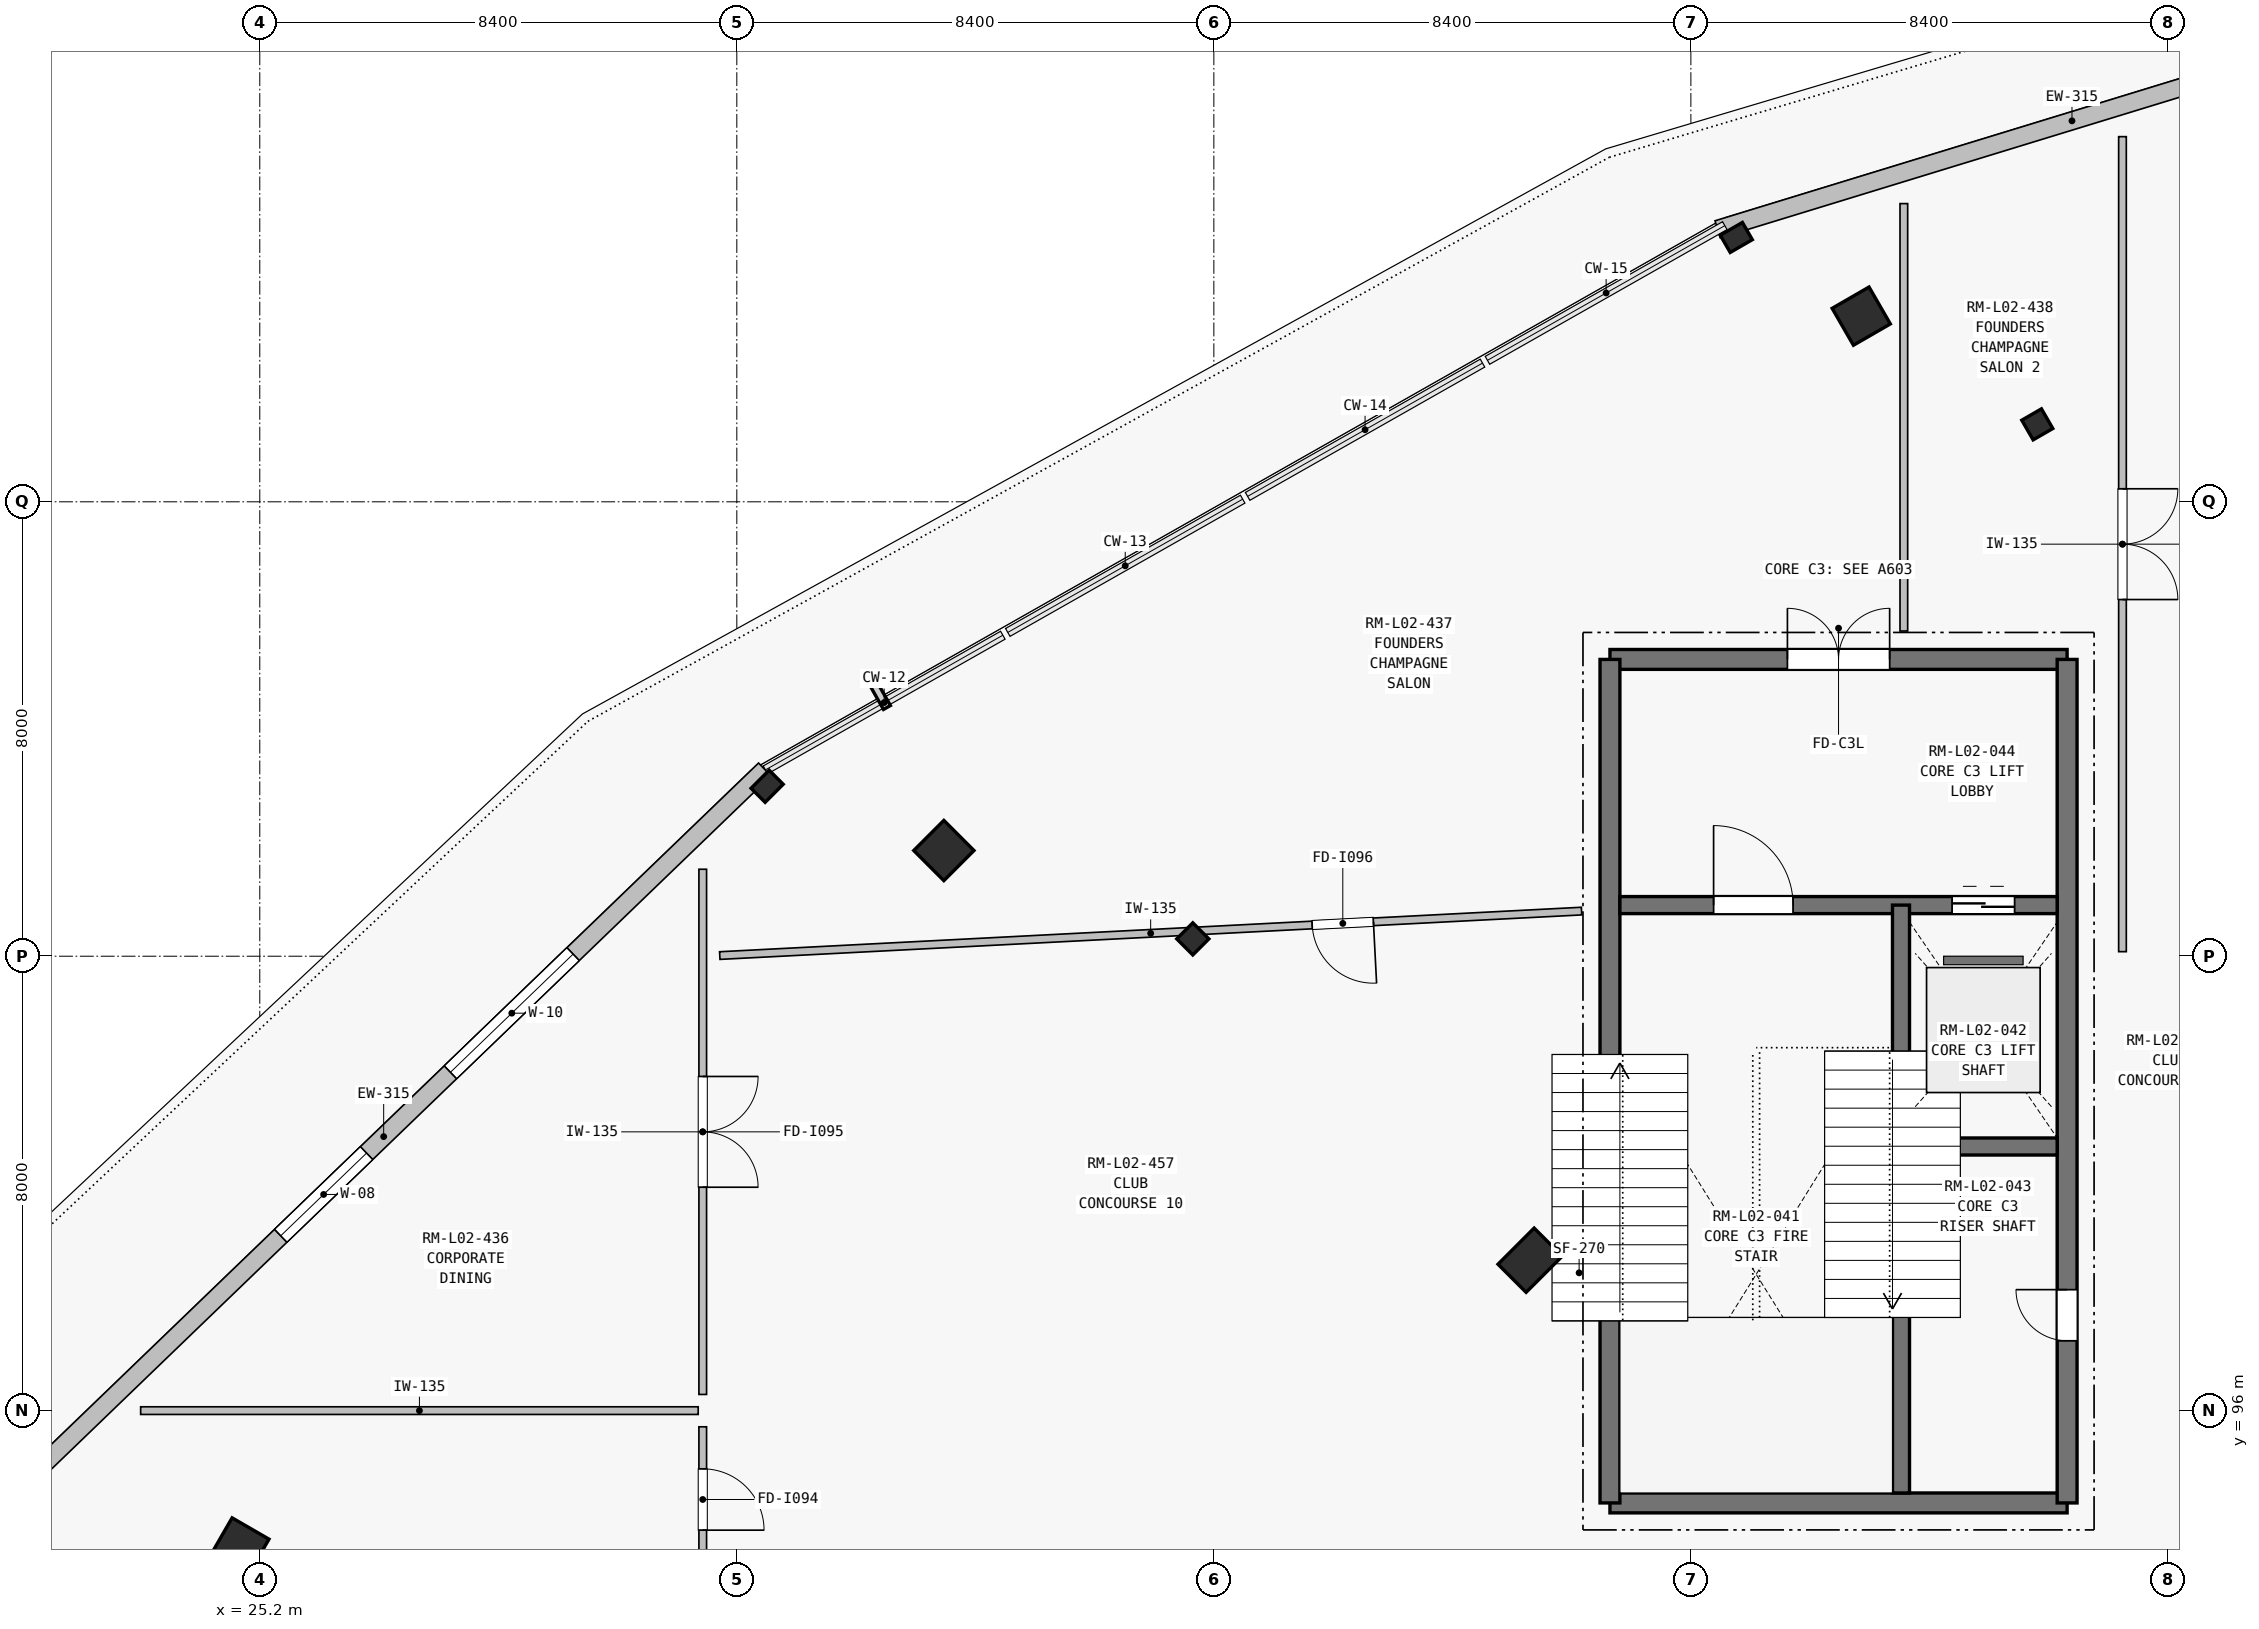
"""IFC4 building model, lengths in metres.
Left out: names, types, materials, properties, quantities, classifications, styles, units other than length and angle.
Written with IfcOpenShell. Run it as: python <this file> out.ifc"""

import sys

from ifc_helpers import new_model, si_unit, direction, frame, frame_2d, origin, origin_2d, place, context, subcontext, project, spatial, rectangle, i_section, extrude, element, fill, save


model = new_model("IFC4")
c1 = context("Model", 3, precision=1e-05, world=origin(), true_north=direction((0.0, 1.0)))
c2 = subcontext(c1, "Body", "Model", "MODEL_VIEW")
j1 = project(units=[si_unit("LENGTHUNIT", "METRE"), si_unit("PLANEANGLEUNIT", "RADIAN")], contexts=[c1])
p1 = place(None, origin())
s1 = spatial("IfcSite", under=j1, at=p1, CompositionType="ELEMENT")
p2 = place(p1, origin())
s2 = spatial("IfcBuilding", under=s1, at=p2, CompositionType="ELEMENT")
p3 = place(p2, frame((0.0, 0.0, 9.9)))
s3 = spatial("IfcBuildingStorey", under=s2, at=p3, CompositionType="ELEMENT", Elevation=9.9)
p4 = place(p3, frame((47.569, 98.648, 0.0), z_axis=(0.0, 0.0, 1.0), x_axis=(-0.707106781187, 0.707106781187, 0.0)))
e1 = element("IfcColumn", 1, at=p4, inside=s3, PredefinedType="COLUMN", context=c2, shape_type="SweptSolid", body=[
    extrude(rectangle(XDim=0.7, YDim=0.9, at=origin_2d()), origin(), (0.0, 0.0, 1.0), 4.5),
])
for number, where, z_axis, x_axis in (
    (2, (56.5, 113.363, 0.0), (0.0, 0.0, 1.0), (-0.5, 0.866, 0.0)),
    (3, (41.63, 104.305, 0.0), (0.0, 0.0, 1.0), (-0.707, 0.707, 0.0)),
):
    element("IfcColumn", number, at=place(p3, frame(where, z_axis=z_axis, x_axis=x_axis)), inside=s3, PredefinedType="COLUMN", context=c2, shape_type="SweptSolid", body=[
        extrude(i_section(OverallWidth=0.4, OverallDepth=0.4, WebThickness=0.016, FlangeThickness=0.028, at=origin_2d()), origin(), (0.0, 0.0, 1.0), 4.5),
    ])
for number, where, z_axis, x_axis in (
    (4, (53.4, 115.269, 0.0), (0.0, 0.0, 1.0), (-0.5, 0.866, 0.0)),
    (5, (37.246, 105.861, 0.0), (0.0, 0.0, 1.0), (-0.707, 0.707, 0.0)),
    (6, (24.85, 93.6, 0.0), (0.0, 0.0, 1.0), (-0.866, 0.5, 0.0)),
):
    element("IfcColumn", number, at=place(p3, frame(where, z_axis=z_axis, x_axis=x_axis)), inside=s3, PredefinedType="COLUMN", context=c2, shape_type="SweptSolid", body=[
        extrude(rectangle(XDim=0.75, YDim=0.75, at=origin_2d()), origin(), (0.0, 0.0, 1.0), 4.5),
    ])
for number, where, z_axis, x_axis in (
    (7, (51.2, 116.654, 0.0), (0.0, 0.0, 1.0), (-0.5, 0.866, 0.0)),
    (8, (34.134, 106.992, 0.0), (0.0, 0.0, 1.0), (-0.707, 0.707, 0.0)),
):
    element("IfcColumn", number, at=place(p3, frame(where, z_axis=z_axis, x_axis=x_axis)), inside=s3, PredefinedType="PILASTER", context=c2, shape_type="SweptSolid", body=[
        extrude(rectangle(XDim=0.35, YDim=0.45, at=origin_2d()), origin(), (0.0, 0.0, 1.0), 5.45),
    ])
p5 = place(p3, frame((20.671, 94.36, 0.0), z_axis=(0.0, 0.0, 1.0), x_axis=(0.720214986834, 0.693750944316, 0.0)))
e9 = element("IfcWall", 9, at=p5, inside=s3, PredefinedType="SOLIDWALL", context=c2, shape_type="SweptSolid", body=[
    extrude(rectangle(XDim=18.635, YDim=0.315, at=frame_2d((9.318, 0.0))), origin(), (0.0, 0.0, 1.0), 4.265),
])
p6 = place(p5, frame((6.8, 0.0, 0.9)))
e10 = element("IfcOpeningElement", 10, at=p6, cuts=e9, PredefinedType="OPENING", context=c2, shape_type="SweptSolid", body=[
    extrude(rectangle(XDim=2.1, YDim=2.0, at=frame_2d((1.05, 1.0))), frame((0.0, 0.167, 0.0), z_axis=(0.0, -1.0, 0.0), x_axis=(1.0, 0.0, 0.0)), (0.0, 0.0, 1.0), 0.335),
])
p7 = place(p5, frame((10.95, 0.0, 0.9)))
e11 = element("IfcOpeningElement", 11, at=p7, cuts=e9, PredefinedType="OPENING", context=c2, shape_type="SweptSolid", body=[
    extrude(rectangle(XDim=3.0, YDim=1.6, at=frame_2d((1.5, 0.8))), frame((0.0, 0.167, 0.0), z_axis=(0.0, -1.0, 0.0), x_axis=(1.0, 0.0, 0.0)), (0.0, 0.0, 1.0), 0.335),
])
p8 = place(p3, frame((50.871, 116.797, 0.0), z_axis=(0.0, 0.0, 1.0), x_axis=(0.956190176803, 0.292746213956, 0.0)))
e12 = element("IfcWall", 12, at=p8, inside=s3, PredefinedType="SOLIDWALL", context=c2, shape_type="SweptSolid", body=[
    extrude(rectangle(XDim=21.25, YDim=0.315, at=frame_2d((10.625, 0.0))), origin(), (0.0, 0.0, 1.0), 4.265),
])
p9 = place(p8, frame((11.025, 0.0, 0.9)))
e13 = element("IfcOpeningElement", 13, at=p9, cuts=e12, PredefinedType="OPENING", context=c2, shape_type="SweptSolid", body=[
    extrude(rectangle(XDim=2.85, YDim=1.6, at=frame_2d((1.425, 0.8))), frame((0.0, 0.167, 0.0), z_axis=(0.0, -1.0, 0.0), x_axis=(1.0, 0.0, 0.0)), (0.0, 0.0, 1.0), 0.335),
])
p10 = place(p8, frame((15.775, 0.0, 0.9)))
e14 = element("IfcOpeningElement", 14, at=p10, cuts=e12, PredefinedType="OPENING", context=c2, shape_type="SweptSolid", body=[
    extrude(rectangle(XDim=2.55, YDim=1.55, at=frame_2d((1.275, 0.775))), frame((0.0, 0.167, 0.0), z_axis=(0.0, -1.0, 0.0), x_axis=(1.0, 0.0, 0.0)), (0.0, 0.0, 1.0), 0.335),
])
p11 = place(p3, frame((48.975, 94.375, 0.0), z_axis=(0.0, 0.0, 1.0), x_axis=(1.0, 0.0, 0.0)))
e15 = element("IfcWall", 15, at=p11, inside=s3, PredefinedType="SHEAR", context=c2, shape_type="SweptSolid", body=[
    extrude(rectangle(XDim=8.05, YDim=0.35, at=frame_2d((4.025, 0.0))), origin(), (0.0, 0.0, 1.0), 4.5),
])
p12 = place(p3, frame((48.975, 109.225, 0.0), z_axis=(0.0, 0.0, 1.0), x_axis=(1.0, 0.0, 0.0)))
e16 = element("IfcWall", 16, at=p12, inside=s3, PredefinedType="SHEAR", context=c2, shape_type="SweptSolid", body=[
    extrude(rectangle(XDim=8.05, YDim=0.35, at=frame_2d((4.025, 0.0))), origin(), (0.0, 0.0, 1.0), 4.5),
])
p13 = place(p12, frame((3.125, 0.0, 0.0)))
e17 = element("IfcOpeningElement", 17, at=p13, cuts=e16, PredefinedType="OPENING", context=c2, shape_type="SweptSolid", body=[
    extrude(rectangle(XDim=1.8, YDim=2.25, at=frame_2d((0.9, 1.125))), frame((0.0, 0.185, 0.0), z_axis=(0.0, -1.0, 0.0), x_axis=(1.0, 0.0, 0.0)), (0.0, 0.0, 1.0), 0.37),
])
p14 = place(p3, frame((48.975, 94.375, 0.0), z_axis=(0.0, 0.0, 1.0), x_axis=(0.0, 1.0, 0.0)))
e18 = element("IfcWall", 18, at=p14, inside=s3, PredefinedType="SHEAR", context=c2, shape_type="SweptSolid", body=[
    extrude(rectangle(XDim=14.85, YDim=0.35, at=frame_2d((7.425, 0.0))), origin(), (0.0, 0.0, 1.0), 4.5),
])
p15 = place(p3, frame((57.025, 94.375, 0.0), z_axis=(0.0, 0.0, 1.0), x_axis=(0.0, 1.0, 0.0)))
e19 = element("IfcWall", 19, at=p15, inside=s3, PredefinedType="SHEAR", context=c2, shape_type="SweptSolid", body=[
    extrude(rectangle(XDim=14.85, YDim=0.35, at=frame_2d((7.425, 0.0))), origin(), (0.0, 0.0, 1.0), 4.5),
])
p16 = place(p15, frame((2.855, 0.0, 0.0)))
e20 = element("IfcOpeningElement", 20, at=p16, cuts=e19, PredefinedType="OPENING", context=c2, shape_type="SweptSolid", body=[
    extrude(rectangle(XDim=0.9, YDim=2.1, at=frame_2d((0.45, 1.05))), frame((0.0, 0.185, 0.0), z_axis=(0.0, -1.0, 0.0), x_axis=(1.0, 0.0, 0.0)), (0.0, 0.0, 1.0), 0.37),
])
p17 = place(p3, frame((49.15, 104.9, 0.0), z_axis=(0.0, 0.0, 1.0), x_axis=(1.0, 0.0, 0.0)))
e21 = element("IfcWall", 21, at=p17, inside=s3, PredefinedType="SHEAR", context=c2, shape_type="SweptSolid", body=[
    extrude(rectangle(XDim=7.7, YDim=0.3, at=frame_2d((3.85, 0.0))), origin(), (0.0, 0.0, 1.0), 4.5),
])
p18 = place(p17, frame((1.65, 0.0, 0.0)))
e22 = element("IfcOpeningElement", 22, at=p18, cuts=e21, PredefinedType="OPENING", context=c2, shape_type="SweptSolid", body=[
    extrude(rectangle(XDim=1.4, YDim=2.2, at=frame_2d((0.7, 1.1))), frame((0.0, 0.16, 0.0), z_axis=(0.0, -1.0, 0.0), x_axis=(1.0, 0.0, 0.0)), (0.0, 0.0, 1.0), 0.32),
])
p19 = place(p17, frame((5.85, 0.0, 0.0)))
e23 = element("IfcOpeningElement", 23, at=p19, cuts=e21, PredefinedType="OPENING", context=c2, shape_type="SweptSolid", body=[
    extrude(rectangle(XDim=1.1, YDim=2.2, at=frame_2d((0.55, 1.1))), frame((0.0, 0.16, 0.0), z_axis=(0.0, -1.0, 0.0), x_axis=(1.0, 0.0, 0.0)), (0.0, 0.0, 1.0), 0.32),
])
p20 = place(p3, frame((54.1, 94.55, 0.0), z_axis=(0.0, 0.0, 1.0), x_axis=(0.0, 1.0, 0.0)))
e24 = element("IfcWall", 24, at=p20, inside=s3, PredefinedType="SHEAR", context=c2, shape_type="SweptSolid", body=[
    extrude(rectangle(XDim=10.35, YDim=0.3, at=frame_2d((5.175, 0.0))), origin(), (0.0, 0.0, 1.0), 4.5),
])
p21 = place(p3, frame((54.25, 100.65, 0.0), z_axis=(0.0, 0.0, 1.0), x_axis=(1.0, 0.0, 0.0)))
e25 = element("IfcWall", 25, at=p21, inside=s3, PredefinedType="SHEAR", context=c2, shape_type="SweptSolid", body=[
    extrude(rectangle(XDim=2.6, YDim=0.3, at=frame_2d((1.3, 0.0))), origin(), (0.0, 0.0, 1.0), 4.5),
])
p22 = place(p3, frame((23.102, 96.0, 0.0), z_axis=(0.0, 0.0, 1.0), x_axis=(1.0, 0.0, 0.0)))
e26 = element("IfcWall", 26, at=p22, inside=s3, PredefinedType="PARTITIONING", context=c2, shape_type="SweptSolid", body=[
    extrude(rectangle(XDim=9.818, YDim=0.135, at=frame_2d((4.909, 0.0))), origin(), (0.0, 0.0, 1.0), 4.19),
])
p23 = place(p3, frame((33.0, 95.715, 0.0), z_axis=(0.0, 0.0, 1.0), x_axis=(0.0, -1.0, 0.0)))
e27 = element("IfcWall", 27, at=p23, inside=s3, PredefinedType="PARTITIONING", context=c2, shape_type="SweptSolid", body=[
    extrude(rectangle(XDim=2.559, YDim=0.135, at=frame_2d((1.28, 0.0))), origin(), (0.0, 0.0, 1.0), 3.255),
])
p24 = place(p23, frame((0.74, 0.0, 0.0)))
e28 = element("IfcOpeningElement", 28, at=p24, cuts=e27, PredefinedType="OPENING", context=c2, shape_type="SweptSolid", body=[
    extrude(rectangle(XDim=1.08, YDim=2.15, at=frame_2d((0.54, 1.075))), frame((0.0, 0.077, 0.0), z_axis=(0.0, -1.0, 0.0), x_axis=(1.0, 0.0, 0.0)), (0.0, 0.0, 1.0), 0.155),
])
p25 = place(p3, frame((33.0, 105.531, 0.0), z_axis=(0.0, 0.0, 1.0), x_axis=(0.0, -1.0, 0.0)))
e29 = element("IfcWall", 29, at=p25, inside=s3, PredefinedType="PARTITIONING", context=c2, shape_type="SweptSolid", body=[
    extrude(rectangle(XDim=9.246, YDim=0.135, at=frame_2d((4.623, 0.0))), origin(), (0.0, 0.0, 1.0), 4.19),
])
p26 = place(p25, frame((3.648, 0.0, 0.0)))
e30 = element("IfcOpeningElement", 30, at=p26, cuts=e29, PredefinedType="OPENING", context=c2, shape_type="SweptSolid", body=[
    extrude(rectangle(XDim=1.95, YDim=2.4, at=frame_2d((0.975, 1.2))), frame((0.0, 0.077, 0.0), z_axis=(0.0, -1.0, 0.0), x_axis=(1.0, 0.0, 0.0)), (0.0, 0.0, 1.0), 0.155),
])
p27 = place(p3, frame((48.475, 104.794, 0.0), z_axis=(0.0, 0.0, 1.0), x_axis=(-0.998670837392, -0.051541813545, 0.0)))
e31 = element("IfcWall", 31, at=p27, inside=s3, PredefinedType="PARTITIONING", context=c2, shape_type="SweptSolid", body=[
    extrude(rectangle(XDim=15.196, YDim=0.135, at=frame_2d((7.598, 0.0))), origin(), (0.0, 0.0, 1.0), 3.255),
])
p28 = place(p27, frame((3.67, 0.0, 0.0)))
e32 = element("IfcOpeningElement", 32, at=p28, cuts=e31, PredefinedType="OPENING", context=c2, shape_type="SweptSolid", body=[
    extrude(rectangle(XDim=1.08, YDim=2.15, at=frame_2d((0.54, 1.075))), frame((0.0, 0.077, 0.0), z_axis=(0.0, -1.0, 0.0), x_axis=(1.0, 0.0, 0.0)), (0.0, 0.0, 1.0), 0.155),
])
p29 = place(p3, frame((54.15, 117.25, 0.0), z_axis=(0.0, 0.0, 1.0), x_axis=(0.0, -1.0, 0.0)))
e33 = element("IfcWall", 33, at=p29, inside=s3, PredefinedType="PARTITIONING", context=c2, shape_type="SweptSolid", body=[
    extrude(rectangle(XDim=7.525, YDim=0.135, at=frame_2d((3.762, 0.0))), origin(), (0.0, 0.0, 1.0), 3.255),
])
p30 = place(p3, frame((58.0, 118.429, 0.0), z_axis=(0.0, 0.0, 1.0), x_axis=(0.0, -1.0, 0.0)))
e34 = element("IfcWall", 34, at=p30, inside=s3, PredefinedType="PARTITIONING", context=c2, shape_type="SweptSolid", body=[
    extrude(rectangle(XDim=14.349, YDim=0.135, at=frame_2d((7.174, 0.0))), origin(), (0.0, 0.0, 1.0), 3.255),
])
p31 = place(p30, frame((6.199, 0.0, 0.0)))
e35 = element("IfcOpeningElement", 35, at=p31, cuts=e34, PredefinedType="OPENING", context=c2, shape_type="SweptSolid", body=[
    extrude(rectangle(XDim=1.95, YDim=2.4, at=frame_2d((0.975, 1.2))), frame((0.0, 0.077, 0.0), z_axis=(0.0, -1.0, 0.0), x_axis=(1.0, 0.0, 0.0)), (0.0, 0.0, 1.0), 0.155),
])
p32 = place(p6, origin())
e36 = element("IfcWindow", 36, at=p32, inside=s3, PartitioningType="SINGLE_PANEL", PredefinedType="WINDOW", context=c2, shape_type="SweptSolid", body=[
    extrude(rectangle(XDim=2.1, YDim=2.0, at=frame_2d((1.05, 1.0))), frame((0.0, 0.03, 0.0), z_axis=(0.0, -1.0, 0.0), x_axis=(1.0, 0.0, 0.0)), (0.0, 0.0, 1.0), 0.06),
])
fill(e10, e36)
p33 = place(p7, origin())
e37 = element("IfcWindow", 37, at=p33, inside=s3, PartitioningType="SINGLE_PANEL", PredefinedType="WINDOW", context=c2, shape_type="SweptSolid", body=[
    extrude(rectangle(XDim=3.0, YDim=1.6, at=frame_2d((1.5, 0.8))), frame((0.0, 0.03, 0.0), z_axis=(0.0, -1.0, 0.0), x_axis=(1.0, 0.0, 0.0)), (0.0, 0.0, 1.0), 0.06),
])
fill(e11, e37)
p34 = place(p13, origin())
e38 = element("IfcDoor", 38, at=p34, inside=s3, OperationType="DOUBLE_DOOR_SINGLE_SWING", PredefinedType="DOOR", context=c2, shape_type="SweptSolid", body=[
    extrude(rectangle(XDim=1.8, YDim=2.25, at=frame_2d((0.9, 1.125))), frame((0.0, 0.025, 0.0), z_axis=(0.0, -1.0, 0.0), x_axis=(1.0, 0.0, 0.0)), (0.0, 0.0, 1.0), 0.05),
])
fill(e17, e38)
p35 = place(p18, origin())
e39 = element("IfcDoor", 39, at=p35, inside=s3, OperationType="SINGLE_SWING_LEFT", PredefinedType="DOOR", context=c2, shape_type="SweptSolid", body=[
    extrude(rectangle(XDim=1.4, YDim=2.2, at=frame_2d((0.7, 1.1))), frame((0.0, 0.025, 0.0), z_axis=(0.0, -1.0, 0.0), x_axis=(1.0, 0.0, 0.0)), (0.0, 0.0, 1.0), 0.05),
])
fill(e22, e39)
p36 = place(p16, origin())
e40 = element("IfcDoor", 40, at=p36, inside=s3, OperationType="SINGLE_SWING_RIGHT", PredefinedType="DOOR", context=c2, shape_type="SweptSolid", body=[
    extrude(rectangle(XDim=0.9, YDim=2.1, at=frame_2d((0.45, 1.05))), frame((0.0, 0.025, 0.0), z_axis=(0.0, -1.0, 0.0), x_axis=(1.0, 0.0, 0.0)), (0.0, 0.0, 1.0), 0.05),
])
fill(e20, e40)
p37 = place(p19, origin())
e41 = element("IfcDoor", 41, at=p37, inside=s3, OperationType="SLIDING_TO_LEFT", PredefinedType="DOOR", context=c2, shape_type="SweptSolid", body=[
    extrude(rectangle(XDim=1.1, YDim=2.2, at=frame_2d((0.55, 1.1))), frame((0.0, 0.025, 0.0), z_axis=(0.0, -1.0, 0.0), x_axis=(1.0, 0.0, 0.0)), (0.0, 0.0, 1.0), 0.05),
])
fill(e23, e41)
p38 = place(p24, origin())
e42 = element("IfcDoor", 42, at=p38, inside=s3, OperationType="SINGLE_SWING_RIGHT", PredefinedType="DOOR", context=c2, shape_type="SweptSolid", body=[
    extrude(rectangle(XDim=1.08, YDim=2.15, at=frame_2d((0.54, 1.075))), frame((0.0, 0.025, 0.0), z_axis=(0.0, -1.0, 0.0), x_axis=(1.0, 0.0, 0.0)), (0.0, 0.0, 1.0), 0.05),
])
fill(e28, e42)
p39 = place(p26, origin())
e43 = element("IfcDoor", 43, at=p39, inside=s3, OperationType="DOUBLE_DOOR_SINGLE_SWING", PredefinedType="DOOR", context=c2, shape_type="SweptSolid", body=[
    extrude(rectangle(XDim=1.95, YDim=2.4, at=frame_2d((0.975, 1.2))), frame((0.0, 0.025, 0.0), z_axis=(0.0, -1.0, 0.0), x_axis=(1.0, 0.0, 0.0)), (0.0, 0.0, 1.0), 0.05),
])
fill(e30, e43)
p40 = place(p28, origin())
e44 = element("IfcDoor", 44, at=p40, inside=s3, OperationType="SINGLE_SWING_LEFT", PredefinedType="DOOR", context=c2, shape_type="SweptSolid", body=[
    extrude(rectangle(XDim=1.08, YDim=2.15, at=frame_2d((0.54, 1.075))), frame((0.0, 0.025, 0.0), z_axis=(0.0, -1.0, 0.0), x_axis=(1.0, 0.0, 0.0)), (0.0, 0.0, 1.0), 0.05),
])
fill(e32, e44)
p41 = place(p31, origin())
e45 = element("IfcDoor", 45, at=p41, inside=s3, OperationType="DOUBLE_DOOR_SINGLE_SWING", PredefinedType="DOOR", context=c2, shape_type="SweptSolid", body=[
    extrude(rectangle(XDim=1.95, YDim=2.4, at=frame_2d((0.975, 1.2))), frame((0.0, 0.025, 0.0), z_axis=(0.0, -1.0, 0.0), x_axis=(1.0, 0.0, 0.0)), (0.0, 0.0, 1.0), 0.05),
])
fill(e35, e45)
save(model, sys.argv[1])
